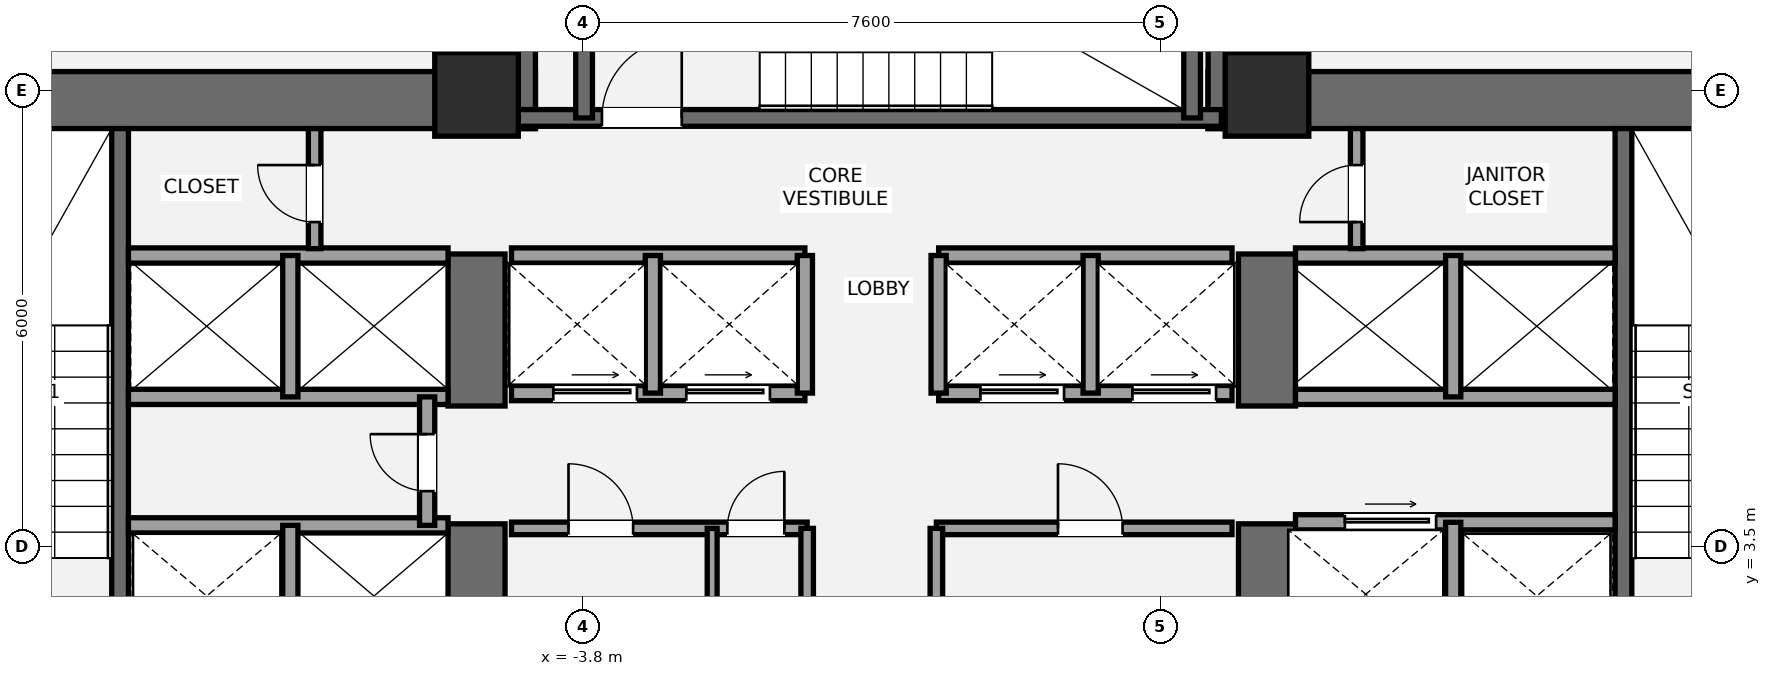
"""IFC4 building model, lengths in metres.
Left out: names, types, materials, properties, quantities, classifications, styles, units other than length and angle.
Written with IfcOpenShell. Run it as: python <this file> out.ifc"""

import sys

from ifc_helpers import new_model, si_unit, direction, frame, frame_2d, origin, origin_2d, place, context, subcontext, project, spatial, rectangle, extrude, element, fill, save


model = new_model("IFC4")
c1 = context("Model", 3, precision=1e-05, world=origin(), true_north=direction((0.0, 1.0)))
c2 = subcontext(c1, "Body", "Model", "MODEL_VIEW")
j1 = project(units=[si_unit("LENGTHUNIT", "METRE"), si_unit("PLANEANGLEUNIT", "RADIAN")], contexts=[c1])
p1 = place(None, origin())
s1 = spatial("IfcSite", under=j1, at=p1, CompositionType="ELEMENT")
p2 = place(p1, origin())
s2 = spatial("IfcBuilding", under=s1, at=p2, CompositionType="ELEMENT")
p3 = place(p2, frame((0.0, 0.0, 110.6)))
s3 = spatial("IfcBuildingStorey", under=s2, at=p3, CompositionType="ELEMENT", Elevation=110.6)
p4 = place(p3, frame((-13.9, 9.375, 0.0), z_axis=(0.0, 0.0, 1.0), x_axis=(1.0, 0.0, 0.0)))
e1 = element("IfcWall", 1, at=p4, inside=s3, PredefinedType="SHEAR", context=c2, shape_type="SweptSolid", body=[
    extrude(rectangle(XDim=9.475, YDim=0.75, at=frame_2d((4.737, 0.0))), origin(), (0.0, 0.0, 1.0), 3.5),
])
p5 = place(p3, frame((-5.2, 1.1, 0.0), z_axis=(0.0, 0.0, 1.0), x_axis=(0.0, 1.0, 0.0)))
e2 = element("IfcWall", 2, at=p5, inside=s3, PredefinedType="SHEAR", context=c2, shape_type="SweptSolid", body=[
    extrude(rectangle(XDim=2.7, YDim=0.75, at=frame_2d((1.35, 0.0))), origin(), (0.0, 0.0, 1.0), 3.5),
])
p6 = place(p3, frame((-5.2, 5.35, 0.0), z_axis=(0.0, 0.0, 1.0), x_axis=(0.0, 1.0, 0.0)))
e3 = element("IfcWall", 3, at=p6, inside=s3, PredefinedType="SHEAR", context=c2, shape_type="SweptSolid", body=[
    extrude(rectangle(XDim=2.0, YDim=0.75, at=frame_2d((1.0, 0.0))), origin(), (0.0, 0.0, 1.0), 3.5),
])
p7 = place(p3, frame((-9.89, 1.85, 0.0), z_axis=(0.0, 0.0, 1.0), x_axis=(0.0, 1.0, 0.0)))
e4 = element("IfcWall", 4, at=p7, inside=s3, PredefinedType="SHEAR", context=c2, shape_type="SweptSolid", body=[
    extrude(rectangle(XDim=7.15, YDim=0.22, at=frame_2d((3.575, 0.0))), origin(), (0.0, 0.0, 1.0), 3.5),
])
p8 = place(p3, frame((4.425, 9.375, 0.0), z_axis=(0.0, 0.0, 1.0), x_axis=(1.0, 0.0, 0.0)))
e5 = element("IfcWall", 5, at=p8, inside=s3, PredefinedType="SHEAR", context=c2, shape_type="SweptSolid", body=[
    extrude(rectangle(XDim=9.475, YDim=0.75, at=frame_2d((4.737, 0.0))), origin(), (0.0, 0.0, 1.0), 3.5),
])
p9 = place(p3, frame((5.2, 1.1, 0.0), z_axis=(0.0, 0.0, 1.0), x_axis=(0.0, 1.0, 0.0)))
e6 = element("IfcWall", 6, at=p9, inside=s3, PredefinedType="SHEAR", context=c2, shape_type="SweptSolid", body=[
    extrude(rectangle(XDim=2.7, YDim=0.75, at=frame_2d((1.35, 0.0))), origin(), (0.0, 0.0, 1.0), 3.5),
])
p10 = place(p3, frame((5.2, 5.35, 0.0), z_axis=(0.0, 0.0, 1.0), x_axis=(0.0, 1.0, 0.0)))
e7 = element("IfcWall", 7, at=p10, inside=s3, PredefinedType="SHEAR", context=c2, shape_type="SweptSolid", body=[
    extrude(rectangle(XDim=2.0, YDim=0.75, at=frame_2d((1.0, 0.0))), origin(), (0.0, 0.0, 1.0), 3.5),
])
p11 = place(p3, frame((9.89, 1.85, 0.0), z_axis=(0.0, 0.0, 1.0), x_axis=(0.0, 1.0, 0.0)))
e8 = element("IfcWall", 8, at=p11, inside=s3, PredefinedType="SHEAR", context=c2, shape_type="SweptSolid", body=[
    extrude(rectangle(XDim=7.15, YDim=0.22, at=frame_2d((3.575, 0.0))), origin(), (0.0, 0.0, 1.0), 3.5),
])
for number, where, z_axis, x_axis in (
    (9, (-4.8, 9.0, 0.0), (0.0, 0.0, 1.0), (0.0, 1.0, 0.0)),
    (10, (4.8, 9.0, 0.0), (0.0, 0.0, 1.0), (0.0, 1.0, 0.0)),
):
    element("IfcWall", number, at=place(p3, frame(where, z_axis=z_axis, x_axis=x_axis)), inside=s3, PredefinedType="SHEAR", context=c2, shape_type="SweptSolid", body=[
        extrude(rectangle(XDim=4.15, YDim=0.75, at=frame_2d((2.075, 0.0))), origin(), (0.0, 0.0, 1.0), 3.5),
    ])
p12 = place(p3, frame((-4.7, 9.14, 0.0), z_axis=(0.0, 0.0, 1.0), x_axis=(1.0, 0.0, 0.0)))
e11 = element("IfcWall", 11, at=p12, inside=s3, PredefinedType="SHEAR", context=c2, shape_type="SweptSolid", body=[
    extrude(rectangle(XDim=9.3, YDim=0.22, at=frame_2d((4.65, 0.0))), origin(), (0.0, 0.0, 1.0), 3.5),
])
p13 = place(p12, frame((1.15, 0.0, 0.0)))
e12 = element("IfcOpeningElement", 12, at=p13, cuts=e11, PredefinedType="OPENING", context=c2, shape_type="SweptSolid", body=[
    extrude(rectangle(XDim=1.05, YDim=2.15, at=frame_2d((0.525, 1.075))), frame((0.0, 0.12, 0.0), z_axis=(0.0, -1.0, 0.0), x_axis=(1.0, 0.0, 0.0)), (0.0, 0.0, 1.0), 0.24),
])
for number, where, z_axis, x_axis in (
    (13, (-3.785, 9.14, 0.0), (0.0, 0.0, 1.0), (0.0, 1.0, 0.0)),
    (14, (4.215, 9.14, 0.0), (0.0, 0.0, 1.0), (0.0, 1.0, 0.0)),
):
    element("IfcWall", number, at=place(p3, frame(where, z_axis=z_axis, x_axis=x_axis)), inside=s3, PredefinedType="SHEAR", context=c2, shape_type="SweptSolid", body=[
        extrude(rectangle(XDim=3.26, YDim=0.22, at=frame_2d((1.63, 0.0))), origin(), (0.0, 0.0, 1.0), 3.5),
    ])
for number, where, z_axis, x_axis in (
    (15, (-5.2, 9.45, 0.0), (0.0, 0.0, 1.0), (1.0, 0.0, 0.0)),
    (16, (5.2, 9.45, 0.0), (0.0, 0.0, 1.0), (1.0, 0.0, 0.0)),
):
    element("IfcColumn", number, at=place(p3, frame(where, z_axis=z_axis, x_axis=x_axis)), inside=s3, PredefinedType="COLUMN", context=c2, shape_type="SweptSolid", body=[
        extrude(rectangle(XDim=1.1, YDim=1.1, at=origin_2d()), origin(), (0.0, 0.0, 1.0), 3.5),
    ])
p14 = place(p3, frame((-9.78, 3.78, 0.0), z_axis=(0.0, 0.0, 1.0), x_axis=(1.0, 0.0, 0.0)))
e17 = element("IfcWall", 17, at=p14, inside=s3, PredefinedType="SOLIDWALL", context=c2, shape_type="SweptSolid", body=[
    extrude(rectangle(XDim=4.205, YDim=0.2, at=frame_2d((2.103, 0.0))), origin(), (0.0, 0.0, 1.0), 3.31),
])
p15 = place(p3, frame((-7.65, 1.85, 0.0), z_axis=(0.0, 0.0, 1.0), x_axis=(0.0, 1.0, 0.0)))
e18 = element("IfcWall", 18, at=p15, inside=s3, PredefinedType="SOLIDWALL", context=c2, shape_type="SweptSolid", body=[
    extrude(rectangle(XDim=1.93, YDim=0.2, at=frame_2d((0.965, 0.0))), origin(), (0.0, 0.0, 1.0), 3.31),
])
for number, where, z_axis, x_axis in (
    (19, (-9.78, 5.47, 0.0), (0.0, 0.0, 1.0), (1.0, 0.0, 0.0)),
    (20, (-9.78, 7.33, 0.0), (0.0, 0.0, 1.0), (1.0, 0.0, 0.0)),
):
    element("IfcWall", number, at=place(p3, frame(where, z_axis=z_axis, x_axis=x_axis)), inside=s3, PredefinedType="SOLIDWALL", context=c2, shape_type="SweptSolid", body=[
        extrude(rectangle(XDim=4.205, YDim=0.2, at=frame_2d((2.103, 0.0))), origin(), (0.0, 0.0, 1.0), 3.31),
    ])
p16 = place(p3, frame((-7.65, 5.47, 0.0), z_axis=(0.0, 0.0, 1.0), x_axis=(0.0, 1.0, 0.0)))
e21 = element("IfcWall", 21, at=p16, inside=s3, PredefinedType="SOLIDWALL", context=c2, shape_type="SweptSolid", body=[
    extrude(rectangle(XDim=1.86, YDim=0.2, at=frame_2d((0.93, 0.0))), origin(), (0.0, 0.0, 1.0), 3.31),
])
p17 = place(p3, frame((-5.85, 3.78, 0.0), z_axis=(0.0, 0.0, 1.0), x_axis=(0.0, 1.0, 0.0)))
e22 = element("IfcWall", 22, at=p17, inside=s3, PredefinedType="SOLIDWALL", context=c2, shape_type="SweptSolid", body=[
    extrude(rectangle(XDim=1.69, YDim=0.2, at=frame_2d((0.845, 0.0))), origin(), (0.0, 0.0, 1.0), 3.31),
])
p18 = place(p17, frame((0.45, 0.0, 0.0)))
e23 = element("IfcOpeningElement", 23, at=p18, cuts=e22, PredefinedType="OPENING", context=c2, shape_type="SweptSolid", body=[
    extrude(rectangle(XDim=0.75, YDim=2.1, at=frame_2d((0.375, 1.05))), frame((0.0, 0.11, 0.0), z_axis=(0.0, -1.0, 0.0), x_axis=(1.0, 0.0, 0.0)), (0.0, 0.0, 1.0), 0.22),
])
p19 = place(p3, frame((5.575, 3.82, 0.0), z_axis=(0.0, 0.0, 1.0), x_axis=(1.0, 0.0, 0.0)))
e24 = element("IfcWall", 24, at=p19, inside=s3, PredefinedType="SOLIDWALL", context=c2, shape_type="SweptSolid", body=[
    extrude(rectangle(XDim=4.205, YDim=0.2, at=frame_2d((2.103, 0.0))), origin(), (0.0, 0.0, 1.0), 3.31),
])
p20 = place(p19, frame((0.65, 0.0, 0.0)))
e25 = element("IfcOpeningElement", 25, at=p20, cuts=e24, PredefinedType="OPENING", context=c2, shape_type="SweptSolid", body=[
    extrude(rectangle(XDim=1.2, YDim=2.2, at=frame_2d((0.6, 1.1))), frame((0.0, 0.11, 0.0), z_axis=(0.0, -1.0, 0.0), x_axis=(1.0, 0.0, 0.0)), (0.0, 0.0, 1.0), 0.22),
])
p21 = place(p3, frame((7.65, 1.85, 0.0), z_axis=(0.0, 0.0, 1.0), x_axis=(0.0, 1.0, 0.0)))
e26 = element("IfcWall", 26, at=p21, inside=s3, PredefinedType="SOLIDWALL", context=c2, shape_type="SweptSolid", body=[
    extrude(rectangle(XDim=1.97, YDim=0.2, at=frame_2d((0.985, 0.0))), origin(), (0.0, 0.0, 1.0), 3.31),
])
for number, where, z_axis, x_axis in (
    (27, (5.575, 5.47, 0.0), (0.0, 0.0, 1.0), (1.0, 0.0, 0.0)),
    (28, (5.575, 7.33, 0.0), (0.0, 0.0, 1.0), (1.0, 0.0, 0.0)),
):
    element("IfcWall", number, at=place(p3, frame(where, z_axis=z_axis, x_axis=x_axis)), inside=s3, PredefinedType="SOLIDWALL", context=c2, shape_type="SweptSolid", body=[
        extrude(rectangle(XDim=4.205, YDim=0.2, at=frame_2d((2.103, 0.0))), origin(), (0.0, 0.0, 1.0), 3.31),
    ])
p22 = place(p3, frame((7.65, 5.47, 0.0), z_axis=(0.0, 0.0, 1.0), x_axis=(0.0, 1.0, 0.0)))
e29 = element("IfcWall", 29, at=p22, inside=s3, PredefinedType="SOLIDWALL", context=c2, shape_type="SweptSolid", body=[
    extrude(rectangle(XDim=1.86, YDim=0.2, at=frame_2d((0.93, 0.0))), origin(), (0.0, 0.0, 1.0), 3.31),
])
p23 = place(p3, frame((-4.74, 3.74, 0.0), z_axis=(0.0, 0.0, 1.0), x_axis=(1.0, 0.0, 0.0)))
e30 = element("IfcWall", 30, at=p23, inside=s3, PredefinedType="PARTITIONING", context=c2, shape_type="SweptSolid", body=[
    extrude(rectangle(XDim=3.89, YDim=0.165, at=frame_2d((1.945, 0.0))), origin(), (0.0, 0.0, 1.0), 3.31),
])
p24 = place(p23, frame((0.75, 0.0, 0.0)))
e31 = element("IfcOpeningElement", 31, at=p24, cuts=e30, PredefinedType="OPENING", context=c2, shape_type="SweptSolid", body=[
    extrude(rectangle(XDim=0.85, YDim=2.1, at=frame_2d((0.425, 1.05))), frame((0.0, 0.093, 0.0), z_axis=(0.0, -1.0, 0.0), x_axis=(1.0, 0.0, 0.0)), (0.0, 0.0, 1.0), 0.185),
])
p25 = place(p23, frame((2.84, 0.0, 0.0)))
e32 = element("IfcOpeningElement", 32, at=p25, cuts=e30, PredefinedType="OPENING", context=c2, shape_type="SweptSolid", body=[
    extrude(rectangle(XDim=0.75, YDim=2.1, at=frame_2d((0.375, 1.05))), frame((0.0, 0.093, 0.0), z_axis=(0.0, -1.0, 0.0), x_axis=(1.0, 0.0, 0.0)), (0.0, 0.0, 1.0), 0.185),
])
p26 = place(p3, frame((-0.85, 1.92, 0.0), z_axis=(0.0, 0.0, 1.0), x_axis=(0.0, 1.0, 0.0)))
e33 = element("IfcWall", 33, at=p26, inside=s3, PredefinedType="PARTITIONING", context=c2, shape_type="SweptSolid", body=[
    extrude(rectangle(XDim=1.82, YDim=0.165, at=frame_2d((0.91, 0.0))), origin(), (0.0, 0.0, 1.0), 3.31),
])
p27 = place(p3, frame((0.85, 3.74, 0.0), z_axis=(0.0, 0.0, 1.0), x_axis=(1.0, 0.0, 0.0)))
e34 = element("IfcWall", 34, at=p27, inside=s3, PredefinedType="PARTITIONING", context=c2, shape_type="SweptSolid", body=[
    extrude(rectangle(XDim=3.89, YDim=0.165, at=frame_2d((1.945, 0.0))), origin(), (0.0, 0.0, 1.0), 3.31),
])
p28 = place(p27, frame((1.6, 0.0, 0.0)))
e35 = element("IfcOpeningElement", 35, at=p28, cuts=e34, PredefinedType="OPENING", context=c2, shape_type="SweptSolid", body=[
    extrude(rectangle(XDim=0.85, YDim=2.1, at=frame_2d((0.425, 1.05))), frame((0.0, 0.093, 0.0), z_axis=(0.0, -1.0, 0.0), x_axis=(1.0, 0.0, 0.0)), (0.0, 0.0, 1.0), 0.185),
])
p29 = place(p3, frame((0.85, 1.92, 0.0), z_axis=(0.0, 0.0, 1.0), x_axis=(0.0, 1.0, 0.0)))
e36 = element("IfcWall", 36, at=p29, inside=s3, PredefinedType="PARTITIONING", context=c2, shape_type="SweptSolid", body=[
    extrude(rectangle(XDim=1.82, YDim=0.165, at=frame_2d((0.91, 0.0))), origin(), (0.0, 0.0, 1.0), 3.31),
])
p30 = place(p3, frame((-2.1, 1.92, 0.0), z_axis=(0.0, 0.0, 1.0), x_axis=(0.0, 1.0, 0.0)))
e37 = element("IfcWall", 37, at=p30, inside=s3, PredefinedType="PARTITIONING", context=c2, shape_type="SweptSolid", body=[
    extrude(rectangle(XDim=1.82, YDim=0.13, at=frame_2d((0.91, 0.0))), origin(), (0.0, 0.0, 1.0), 3.31),
])
p31 = place(p3, frame((-4.74, 5.52, 0.0), z_axis=(0.0, 0.0, 1.0), x_axis=(1.0, 0.0, 0.0)))
e38 = element("IfcWall", 38, at=p31, inside=s3, PredefinedType="SOLIDWALL", context=c2, shape_type="SweptSolid", body=[
    extrude(rectangle(XDim=3.86, YDim=0.2, at=frame_2d((1.93, 0.0))), origin(), (0.0, 0.0, 1.0), 3.31),
])
p32 = place(p31, frame((0.55, 0.0, 0.0)))
e39 = element("IfcOpeningElement", 39, at=p32, cuts=e38, PredefinedType="OPENING", context=c2, shape_type="SweptSolid", body=[
    extrude(rectangle(XDim=1.1, YDim=2.2, at=frame_2d((0.55, 1.1))), frame((0.0, 0.11, 0.0), z_axis=(0.0, -1.0, 0.0), x_axis=(1.0, 0.0, 0.0)), (0.0, 0.0, 1.0), 0.22),
])
p33 = place(p31, frame((2.3, 0.0, 0.0)))
e40 = element("IfcOpeningElement", 40, at=p33, cuts=e38, PredefinedType="OPENING", context=c2, shape_type="SweptSolid", body=[
    extrude(rectangle(XDim=1.1, YDim=2.2, at=frame_2d((0.55, 1.1))), frame((0.0, 0.11, 0.0), z_axis=(0.0, -1.0, 0.0), x_axis=(1.0, 0.0, 0.0)), (0.0, 0.0, 1.0), 0.22),
])
p34 = place(p3, frame((0.88, 5.52, 0.0), z_axis=(0.0, 0.0, 1.0), x_axis=(1.0, 0.0, 0.0)))
e41 = element("IfcWall", 41, at=p34, inside=s3, PredefinedType="SOLIDWALL", context=c2, shape_type="SweptSolid", body=[
    extrude(rectangle(XDim=3.86, YDim=0.2, at=frame_2d((1.93, 0.0))), origin(), (0.0, 0.0, 1.0), 3.31),
])
p35 = place(p34, frame((0.55, 0.0, 0.0)))
e42 = element("IfcOpeningElement", 42, at=p35, cuts=e41, PredefinedType="OPENING", context=c2, shape_type="SweptSolid", body=[
    extrude(rectangle(XDim=1.1, YDim=2.2, at=frame_2d((0.55, 1.1))), frame((0.0, 0.11, 0.0), z_axis=(0.0, -1.0, 0.0), x_axis=(1.0, 0.0, 0.0)), (0.0, 0.0, 1.0), 0.22),
])
p36 = place(p34, frame((2.55, 0.0, 0.0)))
e43 = element("IfcOpeningElement", 43, at=p36, cuts=e41, PredefinedType="OPENING", context=c2, shape_type="SweptSolid", body=[
    extrude(rectangle(XDim=1.1, YDim=2.2, at=frame_2d((0.55, 1.1))), frame((0.0, 0.11, 0.0), z_axis=(0.0, -1.0, 0.0), x_axis=(1.0, 0.0, 0.0)), (0.0, 0.0, 1.0), 0.22),
])
for number, where, z_axis, x_axis in (
    (44, (-4.74, 7.33, 0.0), (0.0, 0.0, 1.0), (1.0, 0.0, 0.0)),
    (45, (0.88, 7.33, 0.0), (0.0, 0.0, 1.0), (1.0, 0.0, 0.0)),
):
    element("IfcWall", number, at=place(p3, frame(where, z_axis=z_axis, x_axis=x_axis)), inside=s3, PredefinedType="SOLIDWALL", context=c2, shape_type="SweptSolid", body=[
        extrude(rectangle(XDim=3.86, YDim=0.2, at=frame_2d((1.93, 0.0))), origin(), (0.0, 0.0, 1.0), 3.31),
    ])
for number, where, z_axis, x_axis in (
    (46, (-2.88, 5.52, 0.0), (0.0, 0.0, 1.0), (0.0, 1.0, 0.0)),
    (47, (2.88, 5.52, 0.0), (0.0, 0.0, 1.0), (0.0, 1.0, 0.0)),
    (48, (-0.88, 5.52, 0.0), (0.0, 0.0, 1.0), (0.0, 1.0, 0.0)),
    (49, (0.88, 5.52, 0.0), (0.0, 0.0, 1.0), (0.0, 1.0, 0.0)),
):
    element("IfcWall", number, at=place(p3, frame(where, z_axis=z_axis, x_axis=x_axis)), inside=s3, PredefinedType="SOLIDWALL", context=c2, shape_type="SweptSolid", body=[
        extrude(rectangle(XDim=1.81, YDim=0.2, at=frame_2d((0.905, 0.0))), origin(), (0.0, 0.0, 1.0), 3.31),
    ])
p37 = place(p3, frame((-7.33, 7.42, 0.0), z_axis=(0.0, 0.0, 1.0), x_axis=(0.0, 1.0, 0.0)))
e50 = element("IfcWall", 50, at=p37, inside=s3, PredefinedType="PARTITIONING", context=c2, shape_type="SweptSolid", body=[
    extrude(rectangle(XDim=1.58, YDim=0.165, at=frame_2d((0.79, 0.0))), origin(), (0.0, 0.0, 1.0), 3.31),
])
p38 = place(p37, frame((0.35, 0.0, 0.0)))
e51 = element("IfcOpeningElement", 51, at=p38, cuts=e50, PredefinedType="OPENING", context=c2, shape_type="SweptSolid", body=[
    extrude(rectangle(XDim=0.75, YDim=2.1, at=frame_2d((0.375, 1.05))), frame((0.0, 0.093, 0.0), z_axis=(0.0, -1.0, 0.0), x_axis=(1.0, 0.0, 0.0)), (0.0, 0.0, 1.0), 0.185),
])
p39 = place(p3, frame((6.38, 7.42, 0.0), z_axis=(0.0, 0.0, 1.0), x_axis=(0.0, 1.0, 0.0)))
e52 = element("IfcWall", 52, at=p39, inside=s3, PredefinedType="PARTITIONING", context=c2, shape_type="SweptSolid", body=[
    extrude(rectangle(XDim=1.58, YDim=0.165, at=frame_2d((0.79, 0.0))), origin(), (0.0, 0.0, 1.0), 3.31),
])
p40 = place(p39, frame((0.35, 0.0, 0.0)))
e53 = element("IfcOpeningElement", 53, at=p40, cuts=e52, PredefinedType="OPENING", context=c2, shape_type="SweptSolid", body=[
    extrude(rectangle(XDim=0.75, YDim=2.1, at=frame_2d((0.375, 1.05))), frame((0.0, 0.093, 0.0), z_axis=(0.0, -1.0, 0.0), x_axis=(1.0, 0.0, 0.0)), (0.0, 0.0, 1.0), 0.185),
])
p41 = place(p13, origin())
e54 = element("IfcDoor", 54, at=p41, inside=s3, OperationType="SINGLE_SWING_RIGHT", PredefinedType="DOOR", context=c2, shape_type="SweptSolid", body=[
    extrude(rectangle(XDim=1.05, YDim=2.15, at=frame_2d((0.525, 1.075))), frame((0.0, 0.025, 0.0), z_axis=(0.0, -1.0, 0.0), x_axis=(1.0, 0.0, 0.0)), (0.0, 0.0, 1.0), 0.05),
])
fill(e12, e54)
p42 = place(p18, origin())
e55 = element("IfcDoor", 55, at=p42, inside=s3, OperationType="SINGLE_SWING_RIGHT", PredefinedType="DOOR", context=c2, shape_type="SweptSolid", body=[
    extrude(rectangle(XDim=0.75, YDim=2.1, at=frame_2d((0.375, 1.05))), frame((0.0, 0.025, 0.0), z_axis=(0.0, -1.0, 0.0), x_axis=(1.0, 0.0, 0.0)), (0.0, 0.0, 1.0), 0.05),
])
fill(e23, e55)
p43 = place(p20, origin())
e56 = element("IfcDoor", 56, at=p43, inside=s3, OperationType="SLIDING_TO_RIGHT", PredefinedType="DOOR", context=c2, shape_type="SweptSolid", body=[
    extrude(rectangle(XDim=1.2, YDim=2.2, at=frame_2d((0.6, 1.1))), frame((0.0, 0.025, 0.0), z_axis=(0.0, -1.0, 0.0), x_axis=(1.0, 0.0, 0.0)), (0.0, 0.0, 1.0), 0.05),
])
fill(e25, e56)
p44 = place(p24, origin())
e57 = element("IfcDoor", 57, at=p44, inside=s3, OperationType="SINGLE_SWING_LEFT", PredefinedType="DOOR", context=c2, shape_type="SweptSolid", body=[
    extrude(rectangle(XDim=0.85, YDim=2.1, at=frame_2d((0.425, 1.05))), frame((0.0, 0.025, 0.0), z_axis=(0.0, -1.0, 0.0), x_axis=(1.0, 0.0, 0.0)), (0.0, 0.0, 1.0), 0.05),
])
fill(e31, e57)
p45 = place(p25, origin())
e58 = element("IfcDoor", 58, at=p45, inside=s3, OperationType="SINGLE_SWING_RIGHT", PredefinedType="DOOR", context=c2, shape_type="SweptSolid", body=[
    extrude(rectangle(XDim=0.75, YDim=2.1, at=frame_2d((0.375, 1.05))), frame((0.0, 0.025, 0.0), z_axis=(0.0, -1.0, 0.0), x_axis=(1.0, 0.0, 0.0)), (0.0, 0.0, 1.0), 0.05),
])
fill(e32, e58)
p46 = place(p28, origin())
e59 = element("IfcDoor", 59, at=p46, inside=s3, OperationType="SINGLE_SWING_LEFT", PredefinedType="DOOR", context=c2, shape_type="SweptSolid", body=[
    extrude(rectangle(XDim=0.85, YDim=2.1, at=frame_2d((0.425, 1.05))), frame((0.0, 0.025, 0.0), z_axis=(0.0, -1.0, 0.0), x_axis=(1.0, 0.0, 0.0)), (0.0, 0.0, 1.0), 0.05),
])
fill(e35, e59)
p47 = place(p32, origin())
e60 = element("IfcDoor", 60, at=p47, inside=s3, OperationType="SLIDING_TO_LEFT", PredefinedType="DOOR", context=c2, shape_type="SweptSolid", body=[
    extrude(rectangle(XDim=1.1, YDim=2.2, at=frame_2d((0.55, 1.1))), frame((0.0, 0.025, 0.0), z_axis=(0.0, -1.0, 0.0), x_axis=(1.0, 0.0, 0.0)), (0.0, 0.0, 1.0), 0.05),
])
fill(e39, e60)
p48 = place(p33, origin())
e61 = element("IfcDoor", 61, at=p48, inside=s3, OperationType="SLIDING_TO_LEFT", PredefinedType="DOOR", context=c2, shape_type="SweptSolid", body=[
    extrude(rectangle(XDim=1.1, YDim=2.2, at=frame_2d((0.55, 1.1))), frame((0.0, 0.025, 0.0), z_axis=(0.0, -1.0, 0.0), x_axis=(1.0, 0.0, 0.0)), (0.0, 0.0, 1.0), 0.05),
])
fill(e40, e61)
p49 = place(p35, origin())
e62 = element("IfcDoor", 62, at=p49, inside=s3, OperationType="SLIDING_TO_LEFT", PredefinedType="DOOR", context=c2, shape_type="SweptSolid", body=[
    extrude(rectangle(XDim=1.1, YDim=2.2, at=frame_2d((0.55, 1.1))), frame((0.0, 0.025, 0.0), z_axis=(0.0, -1.0, 0.0), x_axis=(1.0, 0.0, 0.0)), (0.0, 0.0, 1.0), 0.05),
])
fill(e42, e62)
p50 = place(p36, origin())
e63 = element("IfcDoor", 63, at=p50, inside=s3, OperationType="SLIDING_TO_LEFT", PredefinedType="DOOR", context=c2, shape_type="SweptSolid", body=[
    extrude(rectangle(XDim=1.1, YDim=2.2, at=frame_2d((0.55, 1.1))), frame((0.0, 0.025, 0.0), z_axis=(0.0, -1.0, 0.0), x_axis=(1.0, 0.0, 0.0)), (0.0, 0.0, 1.0), 0.05),
])
fill(e43, e63)
p51 = place(p38, origin())
e64 = element("IfcDoor", 64, at=p51, inside=s3, OperationType="SINGLE_SWING_RIGHT", PredefinedType="DOOR", context=c2, shape_type="SweptSolid", body=[
    extrude(rectangle(XDim=0.75, YDim=2.1, at=frame_2d((0.375, 1.05))), frame((0.0, 0.025, 0.0), z_axis=(0.0, -1.0, 0.0), x_axis=(1.0, 0.0, 0.0)), (0.0, 0.0, 1.0), 0.05),
])
fill(e51, e64)
p52 = place(p40, origin())
e65 = element("IfcDoor", 65, at=p52, inside=s3, OperationType="SINGLE_SWING_LEFT", PredefinedType="DOOR", context=c2, shape_type="SweptSolid", body=[
    extrude(rectangle(XDim=0.75, YDim=2.1, at=frame_2d((0.375, 1.05))), frame((0.0, 0.025, 0.0), z_axis=(0.0, -1.0, 0.0), x_axis=(1.0, 0.0, 0.0)), (0.0, 0.0, 1.0), 0.05),
])
fill(e53, e65)
save(model, sys.argv[1])
